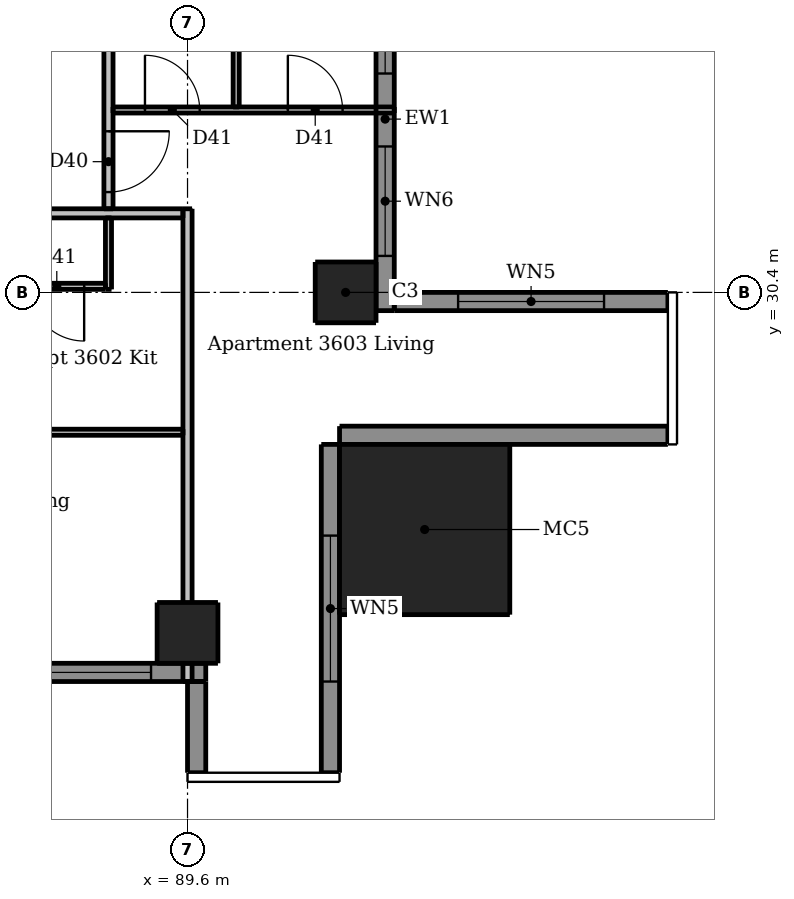
"""IFC4 building model, lengths in metres.
Left out: names, types, materials, properties, quantities, classifications, styles, units other than length and angle.
Written with IfcOpenShell. Run it as: python <this file> out.ifc"""

import sys

from ifc_helpers import new_model, si_unit, direction, frame, frame_2d, origin, origin_2d, place, context, subcontext, project, spatial, rectangle, extrude, element, fill, save


model = new_model("IFC4")
c1 = context("Model", 3, precision=1e-05, world=origin(), true_north=direction((0.0, 1.0)))
c2 = subcontext(c1, "Body", "Model", "MODEL_VIEW")
j1 = project(units=[si_unit("LENGTHUNIT", "METRE"), si_unit("PLANEANGLEUNIT", "RADIAN")], contexts=[c1])
p1 = place(None, origin())
s1 = spatial("IfcSite", under=j1, at=p1, CompositionType="ELEMENT")
p2 = place(p1, origin())
s2 = spatial("IfcBuilding", under=s1, at=p2, CompositionType="ELEMENT")
p3 = place(p2, frame((0.0, 0.0, 137.2)))
s3 = spatial("IfcBuildingStorey", under=s2, at=p3, CompositionType="ELEMENT", Elevation=137.2)
for number, where, z_axis, x_axis in (
    (1, (89.6, 24.8, 0.0), (0.0, 0.0, 1.0), (1.0, 0.0, 0.0)),
    (2, (92.2, 30.4, 0.0), (0.0, 0.0, 1.0), (1.0, 0.0, 0.0)),
):
    element("IfcColumn", number, at=place(p3, frame(where, z_axis=z_axis, x_axis=x_axis)), inside=s3, PredefinedType="COLUMN", context=c2, shape_type="SweptSolid", body=[
        extrude(rectangle(XDim=1.0, YDim=1.0, at=origin_2d()), origin(), (0.0, 0.0, 1.0), 3.05),
    ])
p4 = place(p3, frame((93.5, 26.5, 0.0), z_axis=(0.0, 0.0, 1.0), x_axis=(1.0, 0.0, 0.0)))
e3 = element("IfcColumn", 3, at=p4, inside=s3, PredefinedType="COLUMN", context=c2, shape_type="SweptSolid", body=[
    extrude(rectangle(XDim=2.8, YDim=2.8, at=origin_2d()), origin(), (0.0, 0.0, 1.0), 3.3),
])
p5 = place(p3, frame((89.75, 24.0, 0.0), z_axis=(0.0, 0.0, 1.0), x_axis=(0.0, -1.0, 0.0)))
e4 = element("IfcWall", 4, at=p5, inside=s3, PredefinedType="SOLIDWALL", context=c2, shape_type="SweptSolid", body=[
    extrude(rectangle(XDim=1.5, YDim=0.3, at=frame_2d((0.75, 0.0))), origin(), (0.0, 0.0, 1.0), 3.05),
])
p6 = place(p3, frame((91.95, 22.5, 0.0), z_axis=(0.0, 0.0, 1.0), x_axis=(0.0, 1.0, 0.0)))
e5 = element("IfcWall", 5, at=p6, inside=s3, PredefinedType="SOLIDWALL", context=c2, shape_type="SweptSolid", body=[
    extrude(rectangle(XDim=5.4, YDim=0.3, at=frame_2d((2.7, 0.0))), origin(), (0.0, 0.0, 1.0), 3.05),
])
p7 = place(p6, frame((1.5, 0.0, 0.15)))
e6 = element("IfcOpeningElement", 6, at=p7, cuts=e5, PredefinedType="OPENING", context=c2, shape_type="SweptSolid", body=[
    extrude(rectangle(XDim=2.4, YDim=2.1, at=frame_2d((1.2, 1.05))), frame((0.0, 0.16, 0.0), z_axis=(0.0, -1.0, 0.0), x_axis=(1.0, 0.0, 0.0)), (0.0, 0.0, 1.0), 0.32),
])
p8 = place(p3, frame((92.1, 28.05, 0.0), z_axis=(0.0, 0.0, 1.0), x_axis=(1.0, 0.0, 0.0)))
e7 = element("IfcWall", 7, at=p8, inside=s3, PredefinedType="SOLIDWALL", context=c2, shape_type="SweptSolid", body=[
    extrude(rectangle(XDim=5.4, YDim=0.3, at=frame_2d((2.7, 0.0))), origin(), (0.0, 0.0, 1.0), 3.05),
])
p9 = place(p3, frame((97.5, 30.25, 0.0), z_axis=(0.0, 0.0, 1.0), x_axis=(-1.0, 0.0, 0.0)))
e8 = element("IfcWall", 8, at=p9, inside=s3, PredefinedType="SOLIDWALL", context=c2, shape_type="SweptSolid", body=[
    extrude(rectangle(XDim=4.5, YDim=0.3, at=frame_2d((2.25, 0.0))), origin(), (0.0, 0.0, 1.0), 3.05),
])
p10 = place(p9, frame((1.05, 0.0, 0.15)))
e9 = element("IfcOpeningElement", 9, at=p10, cuts=e8, PredefinedType="OPENING", context=c2, shape_type="SweptSolid", body=[
    extrude(rectangle(XDim=2.4, YDim=2.1, at=frame_2d((1.2, 1.05))), frame((0.0, 0.16, 0.0), z_axis=(0.0, -1.0, 0.0), x_axis=(1.0, 0.0, 0.0)), (0.0, 0.0, 1.0), 0.32),
])
p11 = place(p3, frame((83.6, 24.15, 0.0), z_axis=(0.0, 0.0, 1.0), x_axis=(1.0, 0.0, 0.0)))
e10 = element("IfcWall", 10, at=p11, inside=s3, PredefinedType="SOLIDWALL", context=c2, shape_type="SweptSolid", body=[
    extrude(rectangle(XDim=6.3, YDim=0.3, at=frame_2d((3.15, 0.0))), origin(), (0.0, 0.0, 1.0), 3.05),
])
p12 = place(p11, frame((0.6, 0.0, 0.15)))
e11 = element("IfcOpeningElement", 11, at=p12, cuts=e10, PredefinedType="OPENING", context=c2, shape_type="SweptSolid", body=[
    extrude(rectangle(XDim=1.8, YDim=2.1, at=frame_2d((0.9, 1.05))), frame((0.0, 0.16, 0.0), z_axis=(0.0, -1.0, 0.0), x_axis=(1.0, 0.0, 0.0)), (0.0, 0.0, 1.0), 0.32),
])
p13 = place(p11, frame((3.6, 0.0, 0.15)))
e12 = element("IfcOpeningElement", 12, at=p13, cuts=e10, PredefinedType="OPENING", context=c2, shape_type="SweptSolid", body=[
    extrude(rectangle(XDim=1.8, YDim=2.1, at=frame_2d((0.9, 1.05))), frame((0.0, 0.16, 0.0), z_axis=(0.0, -1.0, 0.0), x_axis=(1.0, 0.0, 0.0)), (0.0, 0.0, 1.0), 0.32),
])
p14 = place(p3, frame((92.85, 30.1, 0.0), z_axis=(0.0, 0.0, 1.0), x_axis=(0.0, 1.0, 0.0)))
e13 = element("IfcWall", 13, at=p14, inside=s3, PredefinedType="SOLIDWALL", context=c2, shape_type="SweptSolid", body=[
    extrude(rectangle(XDim=6.3, YDim=0.3, at=frame_2d((3.15, 0.0))), origin(), (0.0, 0.0, 1.0), 3.05),
])
p15 = place(p14, frame((0.9, 0.0, 0.15)))
e14 = element("IfcOpeningElement", 14, at=p15, cuts=e13, PredefinedType="OPENING", context=c2, shape_type="SweptSolid", body=[
    extrude(rectangle(XDim=1.8, YDim=2.1, at=frame_2d((0.9, 1.05))), frame((0.0, 0.16, 0.0), z_axis=(0.0, -1.0, 0.0), x_axis=(1.0, 0.0, 0.0)), (0.0, 0.0, 1.0), 0.32),
])
p16 = place(p14, frame((3.9, 0.0, 0.15)))
e15 = element("IfcOpeningElement", 15, at=p16, cuts=e13, PredefinedType="OPENING", context=c2, shape_type="SweptSolid", body=[
    extrude(rectangle(XDim=1.8, YDim=2.1, at=frame_2d((0.9, 1.05))), frame((0.0, 0.16, 0.0), z_axis=(0.0, -1.0, 0.0), x_axis=(1.0, 0.0, 0.0)), (0.0, 0.0, 1.0), 0.32),
])
p17 = place(p3, frame((88.3, 30.45, 0.0), z_axis=(0.0, 0.0, 1.0), x_axis=(0.0, 1.0, 0.0)))
e16 = element("IfcWall", 16, at=p17, inside=s3, PredefinedType="PARTITIONING", context=c2, shape_type="SweptSolid", body=[
    extrude(rectangle(XDim=1.175, YDim=0.1, at=frame_2d((0.587, 0.0))), origin(), (0.0, 0.0, 1.0), 3.05),
])
p18 = place(p3, frame((90.4, 33.45, 0.0), z_axis=(0.0, 0.0, 1.0), x_axis=(0.0, 1.0, 0.0)))
e17 = element("IfcWall", 17, at=p18, inside=s3, PredefinedType="PARTITIONING", context=c2, shape_type="SweptSolid", body=[
    extrude(rectangle(XDim=5.975, YDim=0.1, at=frame_2d((2.988, 0.0))), origin(), (0.0, 0.0, 1.0), 3.05),
])
p19 = place(p18, frame((3.8, 0.0, 0.0)))
e18 = element("IfcOpeningElement", 18, at=p19, cuts=e17, PredefinedType="OPENING", context=c2, shape_type="SweptSolid", body=[
    extrude(rectangle(XDim=0.8, YDim=2.1, at=frame_2d((0.4, 1.05))), frame((0.0, 0.06, 0.0), z_axis=(0.0, -1.0, 0.0), x_axis=(1.0, 0.0, 0.0)), (0.0, 0.0, 1.0), 0.12),
])
p20 = place(p3, frame((88.375, 33.4, 0.0), z_axis=(0.0, 0.0, 1.0), x_axis=(1.0, 0.0, 0.0)))
e19 = element("IfcWall", 19, at=p20, inside=s3, PredefinedType="PARTITIONING", context=c2, shape_type="SweptSolid", body=[
    extrude(rectangle(XDim=4.625, YDim=0.1, at=frame_2d((2.312, 0.0))), origin(), (0.0, 0.0, 1.0), 3.05),
])
p21 = place(p20, frame((0.525, 0.0, 0.0)))
e20 = element("IfcOpeningElement", 20, at=p21, cuts=e19, PredefinedType="OPENING", context=c2, shape_type="SweptSolid", body=[
    extrude(rectangle(XDim=0.9, YDim=2.1, at=frame_2d((0.45, 1.05))), frame((0.0, 0.06, 0.0), z_axis=(0.0, -1.0, 0.0), x_axis=(1.0, 0.0, 0.0)), (0.0, 0.0, 1.0), 0.12),
])
p22 = place(p20, frame((2.875, 0.0, 0.0)))
e21 = element("IfcOpeningElement", 21, at=p22, cuts=e19, PredefinedType="OPENING", context=c2, shape_type="SweptSolid", body=[
    extrude(rectangle(XDim=0.9, YDim=2.1, at=frame_2d((0.45, 1.05))), frame((0.0, 0.06, 0.0), z_axis=(0.0, -1.0, 0.0), x_axis=(1.0, 0.0, 0.0)), (0.0, 0.0, 1.0), 0.12),
])
p23 = place(p3, frame((88.25, 30.5, 0.0), z_axis=(0.0, 0.0, 1.0), x_axis=(-1.0, 0.0, 0.0)))
e22 = element("IfcWall", 22, at=p23, inside=s3, PredefinedType="PARTITIONING", context=c2, shape_type="SweptSolid", body=[
    extrude(rectangle(XDim=16.575, YDim=0.1, at=frame_2d((8.288, 0.0))), origin(), (0.0, 0.0, 1.0), 3.05),
])
p24 = place(p23, frame((4.2, 0.0, 0.0)))
e23 = element("IfcOpeningElement", 23, at=p24, cuts=e22, PredefinedType="OPENING", context=c2, shape_type="SweptSolid", body=[
    extrude(rectangle(XDim=0.9, YDim=2.1, at=frame_2d((0.45, 1.05))), frame((0.0, 0.06, 0.0), z_axis=(0.0, -1.0, 0.0), x_axis=(1.0, 0.0, 0.0)), (0.0, 0.0, 1.0), 0.12),
])
p25 = place(p23, frame((0.35, 0.0, 0.0)))
e24 = element("IfcOpeningElement", 24, at=p25, cuts=e22, PredefinedType="OPENING", context=c2, shape_type="SweptSolid", body=[
    extrude(rectangle(XDim=0.9, YDim=2.1, at=frame_2d((0.45, 1.05))), frame((0.0, 0.06, 0.0), z_axis=(0.0, -1.0, 0.0), x_axis=(1.0, 0.0, 0.0)), (0.0, 0.0, 1.0), 0.12),
])
p26 = place(p23, frame((14.65, 0.0, 0.0)))
e25 = element("IfcOpeningElement", 25, at=p26, cuts=e22, PredefinedType="OPENING", context=c2, shape_type="SweptSolid", body=[
    extrude(rectangle(XDim=0.9, YDim=2.1, at=frame_2d((0.45, 1.05))), frame((0.0, 0.06, 0.0), z_axis=(0.0, -1.0, 0.0), x_axis=(1.0, 0.0, 0.0)), (0.0, 0.0, 1.0), 0.12),
])
p27 = place(p23, frame((11.35, 0.0, 0.0)))
e26 = element("IfcOpeningElement", 26, at=p27, cuts=e22, PredefinedType="OPENING", context=c2, shape_type="SweptSolid", body=[
    extrude(rectangle(XDim=0.9, YDim=2.1, at=frame_2d((0.45, 1.05))), frame((0.0, 0.06, 0.0), z_axis=(0.0, -1.0, 0.0), x_axis=(1.0, 0.0, 0.0)), (0.0, 0.0, 1.0), 0.12),
])
p28 = place(p23, frame((8.45, 0.0, 0.0)))
e27 = element("IfcOpeningElement", 27, at=p28, cuts=e22, PredefinedType="OPENING", context=c2, shape_type="SweptSolid", body=[
    extrude(rectangle(XDim=0.8, YDim=2.1, at=frame_2d((0.4, 1.05))), frame((0.0, 0.06, 0.0), z_axis=(0.0, -1.0, 0.0), x_axis=(1.0, 0.0, 0.0)), (0.0, 0.0, 1.0), 0.12),
])
p29 = place(p3, frame((86.65, 28.1, 0.0), z_axis=(0.0, 0.0, 1.0), x_axis=(1.0, 0.0, 0.0)))
e28 = element("IfcWall", 28, at=p29, inside=s3, PredefinedType="PARTITIONING", context=c2, shape_type="SweptSolid", body=[
    extrude(rectangle(XDim=2.875, YDim=0.1, at=frame_2d((1.438, 0.0))), origin(), (0.0, 0.0, 1.0), 3.05),
])
p30 = place(p3, frame((88.3, 60.475, 0.0), z_axis=(0.0, 0.0, 1.0), x_axis=(0.0, -1.0, 0.0)))
e29 = element("IfcWall", 29, at=p30, inside=s3, PredefinedType="PARTITIONING", context=c2, shape_type="SweptSolid", body=[
    extrude(rectangle(XDim=28.7, YDim=0.15, at=frame_2d((14.35, 0.0))), origin(), (0.0, 0.0, 1.0), 3.05),
])
p31 = place(p30, frame((27.425, 0.0, 0.0)))
e30 = element("IfcOpeningElement", 30, at=p31, cuts=e29, PredefinedType="OPENING", context=c2, shape_type="SweptSolid", body=[
    extrude(rectangle(XDim=1.0, YDim=2.1, at=frame_2d((0.5, 1.05))), frame((0.0, 0.085, 0.0), z_axis=(0.0, -1.0, 0.0), x_axis=(1.0, 0.0, 0.0)), (0.0, 0.0, 1.0), 0.17),
])
p32 = place(p30, frame((10.575, 0.0, 0.0)))
e31 = element("IfcOpeningElement", 31, at=p32, cuts=e29, PredefinedType="OPENING", context=c2, shape_type="SweptSolid", body=[
    extrude(rectangle(XDim=1.0, YDim=2.1, at=frame_2d((0.5, 1.05))), frame((0.0, 0.085, 0.0), z_axis=(0.0, -1.0, 0.0), x_axis=(1.0, 0.0, 0.0)), (0.0, 0.0, 1.0), 0.17),
])
p33 = place(p3, frame((89.6, 24.0, 0.0), z_axis=(0.0, 0.0, 1.0), x_axis=(0.0, 1.0, 0.0)))
e32 = element("IfcWall", 32, at=p33, inside=s3, PredefinedType="PARTITIONING", context=c2, shape_type="SweptSolid", body=[
    extrude(rectangle(XDim=7.775, YDim=0.15, at=frame_2d((3.887, 0.0))), origin(), (0.0, 0.0, 1.0), 2.51),
])
p34 = place(p3, frame((89.525, 31.7, 0.0), z_axis=(0.0, 0.0, 1.0), x_axis=(-1.0, 0.0, 0.0)))
e33 = element("IfcWall", 33, at=p34, inside=s3, PredefinedType="PARTITIONING", context=c2, shape_type="SweptSolid", body=[
    extrude(rectangle(XDim=28.75, YDim=0.15, at=frame_2d((14.375, 0.0))), origin(), (0.0, 0.0, 1.0), 3.05),
])
p35 = place(p34, frame((25.875, 0.0, 0.0)))
e34 = element("IfcOpeningElement", 34, at=p35, cuts=e33, PredefinedType="OPENING", context=c2, shape_type="SweptSolid", body=[
    extrude(rectangle(XDim=1.0, YDim=2.1, at=frame_2d((0.5, 1.05))), frame((0.0, 0.085, 0.0), z_axis=(0.0, -1.0, 0.0), x_axis=(1.0, 0.0, 0.0)), (0.0, 0.0, 1.0), 0.17),
])
p36 = place(p34, frame((9.075, 0.0, 0.0)))
e35 = element("IfcOpeningElement", 35, at=p36, cuts=e33, PredefinedType="OPENING", context=c2, shape_type="SweptSolid", body=[
    extrude(rectangle(XDim=1.0, YDim=2.1, at=frame_2d((0.5, 1.05))), frame((0.0, 0.085, 0.0), z_axis=(0.0, -1.0, 0.0), x_axis=(1.0, 0.0, 0.0)), (0.0, 0.0, 1.0), 0.17),
])
p37 = place(p7, origin())
e36 = element("IfcWindow", 36, at=p37, inside=s3, PartitioningType="DOUBLE_PANEL_VERTICAL", PredefinedType="WINDOW", context=c2, shape_type="SweptSolid", body=[
    extrude(rectangle(XDim=2.4, YDim=2.1, at=frame_2d((1.2, 1.05))), frame((0.0, 0.03, 0.0), z_axis=(0.0, -1.0, 0.0), x_axis=(1.0, 0.0, 0.0)), (0.0, 0.0, 1.0), 0.06),
])
fill(e6, e36)
p38 = place(p10, origin())
e37 = element("IfcWindow", 37, at=p38, inside=s3, PartitioningType="DOUBLE_PANEL_VERTICAL", PredefinedType="WINDOW", context=c2, shape_type="SweptSolid", body=[
    extrude(rectangle(XDim=2.4, YDim=2.1, at=frame_2d((1.2, 1.05))), frame((0.0, 0.03, 0.0), z_axis=(0.0, -1.0, 0.0), x_axis=(1.0, 0.0, 0.0)), (0.0, 0.0, 1.0), 0.06),
])
fill(e9, e37)
p39 = place(p13, origin())
e38 = element("IfcWindow", 38, at=p39, inside=s3, PartitioningType="DOUBLE_PANEL_VERTICAL", PredefinedType="WINDOW", context=c2, shape_type="SweptSolid", body=[
    extrude(rectangle(XDim=1.8, YDim=2.1, at=frame_2d((0.9, 1.05))), frame((0.0, 0.03, 0.0), z_axis=(0.0, -1.0, 0.0), x_axis=(1.0, 0.0, 0.0)), (0.0, 0.0, 1.0), 0.06),
])
fill(e12, e38)
p40 = place(p15, origin())
e39 = element("IfcWindow", 39, at=p40, inside=s3, PartitioningType="DOUBLE_PANEL_VERTICAL", PredefinedType="WINDOW", context=c2, shape_type="SweptSolid", body=[
    extrude(rectangle(XDim=1.8, YDim=2.1, at=frame_2d((0.9, 1.05))), frame((0.0, 0.03, 0.0), z_axis=(0.0, -1.0, 0.0), x_axis=(1.0, 0.0, 0.0)), (0.0, 0.0, 1.0), 0.06),
])
fill(e14, e39)
p41 = place(p16, origin())
e40 = element("IfcWindow", 40, at=p41, inside=s3, PartitioningType="DOUBLE_PANEL_VERTICAL", PredefinedType="WINDOW", context=c2, shape_type="SweptSolid", body=[
    extrude(rectangle(XDim=1.8, YDim=2.1, at=frame_2d((0.9, 1.05))), frame((0.0, 0.03, 0.0), z_axis=(0.0, -1.0, 0.0), x_axis=(1.0, 0.0, 0.0)), (0.0, 0.0, 1.0), 0.06),
])
fill(e15, e40)
p42 = place(p25, origin())
e41 = element("IfcDoor", 41, at=p42, inside=s3, OperationType="SINGLE_SWING_LEFT", PredefinedType="DOOR", context=c2, shape_type="SweptSolid", body=[
    extrude(rectangle(XDim=0.9, YDim=2.1, at=frame_2d((0.45, 1.05))), frame((0.0, 0.025, 0.0), z_axis=(0.0, -1.0, 0.0), x_axis=(1.0, 0.0, 0.0)), (0.0, 0.0, 1.0), 0.05),
])
fill(e24, e41)
p43 = place(p31, origin())
e42 = element("IfcDoor", 42, at=p43, inside=s3, OperationType="SINGLE_SWING_LEFT", PredefinedType="DOOR", context=c2, shape_type="SweptSolid", body=[
    extrude(rectangle(XDim=1.0, YDim=2.1, at=frame_2d((0.5, 1.05))), frame((0.0, 0.025, 0.0), z_axis=(0.0, -1.0, 0.0), x_axis=(1.0, 0.0, 0.0)), (0.0, 0.0, 1.0), 0.05),
])
fill(e30, e42)
p44 = place(p21, origin())
e43 = element("IfcDoor", 43, at=p44, inside=s3, OperationType="SINGLE_SWING_LEFT", PredefinedType="DOOR", context=c2, shape_type="SweptSolid", body=[
    extrude(rectangle(XDim=0.9, YDim=2.1, at=frame_2d((0.45, 1.05))), frame((0.0, 0.025, 0.0), z_axis=(0.0, -1.0, 0.0), x_axis=(1.0, 0.0, 0.0)), (0.0, 0.0, 1.0), 0.05),
])
fill(e20, e43)
p45 = place(p22, origin())
e44 = element("IfcDoor", 44, at=p45, inside=s3, OperationType="SINGLE_SWING_LEFT", PredefinedType="DOOR", context=c2, shape_type="SweptSolid", body=[
    extrude(rectangle(XDim=0.9, YDim=2.1, at=frame_2d((0.45, 1.05))), frame((0.0, 0.025, 0.0), z_axis=(0.0, -1.0, 0.0), x_axis=(1.0, 0.0, 0.0)), (0.0, 0.0, 1.0), 0.05),
])
fill(e21, e44)
save(model, sys.argv[1])
